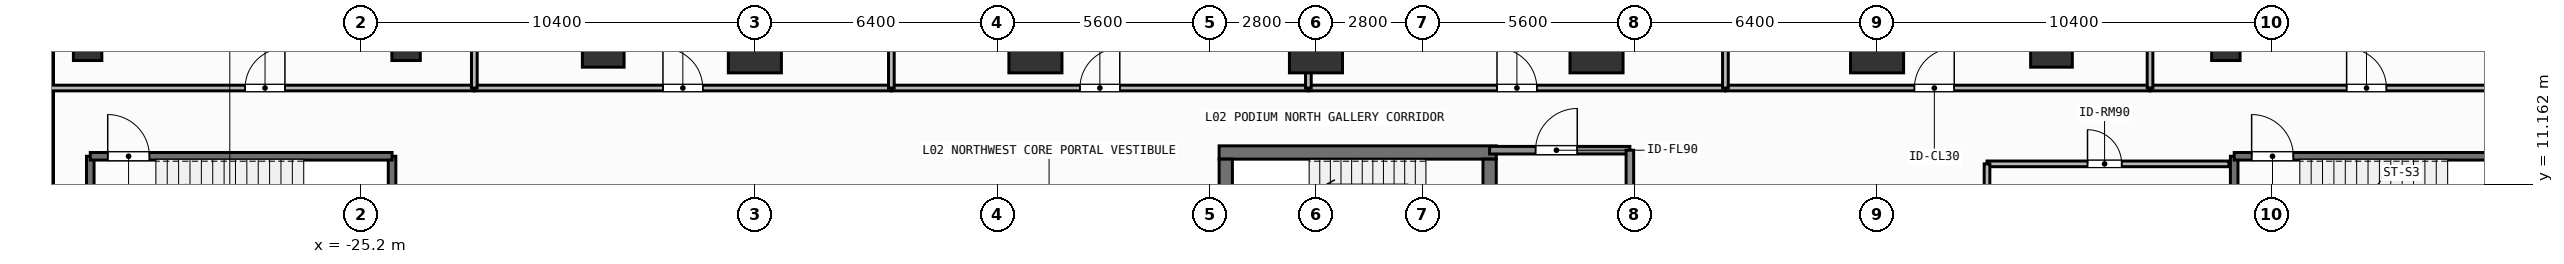
"""IFC4 building model, lengths in metres.
Left out: names, types, materials, properties, quantities, classifications, styles, units other than length and angle.
Written with IfcOpenShell. Run it as: python <this file> out.ifc"""

import sys

from ifc_helpers import new_model, si_unit, direction, frame, frame_2d, origin, origin_2d, place, context, subcontext, project, spatial, rectangle, extrude, element, fill, save


model = new_model("IFC4")
c1 = context("Model", 3, precision=1e-05, world=origin(), true_north=direction((0.0, 1.0)))
c2 = subcontext(c1, "Body", "Model", "MODEL_VIEW")
j1 = project(units=[si_unit("LENGTHUNIT", "METRE"), si_unit("PLANEANGLEUNIT", "RADIAN")], contexts=[c1])
p1 = place(None, origin())
s1 = spatial("IfcSite", under=j1, at=p1, CompositionType="ELEMENT")
p2 = place(p1, origin())
s2 = spatial("IfcBuilding", under=s1, at=p2, CompositionType="ELEMENT")
p3 = place(p2, frame((0.0, 0.0, 4.8)))
s3 = spatial("IfcBuildingStorey", under=s2, at=p3, CompositionType="ELEMENT", Elevation=4.8)
p4 = place(p3, frame((-2.555, 12.0, 0.0), z_axis=(0.0, 0.0, 1.0), x_axis=(1.0, 0.0, 0.0)))
e1 = element("IfcWall", 1, at=p4, inside=s3, PredefinedType="SHEAR", context=c2, shape_type="SweptSolid", body=[
    extrude(rectangle(XDim=7.31, YDim=0.35, at=frame_2d((3.655, 0.0))), origin(), (0.0, 0.0, 1.0), 4.2),
])
p5 = place(p3, frame((-2.38, 8.9, 0.0), z_axis=(0.0, 0.0, 1.0), x_axis=(0.0, 1.0, 0.0)))
e2 = element("IfcWall", 2, at=p5, inside=s3, PredefinedType="SHEAR", context=c2, shape_type="SweptSolid", body=[
    extrude(rectangle(XDim=2.925, YDim=0.35, at=frame_2d((1.462, 0.0))), origin(), (0.0, 0.0, 1.0), 4.2),
])
p6 = place(p3, frame((4.58, 11.825, 0.0), z_axis=(0.0, 0.0, 1.0), x_axis=(0.0, -1.0, 0.0)))
e3 = element("IfcWall", 3, at=p6, inside=s3, PredefinedType="SHEAR", context=c2, shape_type="SweptSolid", body=[
    extrude(rectangle(XDim=2.925, YDim=0.35, at=frame_2d((1.462, 0.0))), origin(), (0.0, 0.0, 1.0), 4.2),
])
p7 = place(p6, frame((0.913, 0.0, 0.0)))
e4 = element("IfcOpeningElement", 4, at=p7, cuts=e3, PredefinedType="OPENING", context=c2, shape_type="SweptSolid", body=[
    extrude(rectangle(XDim=1.1, YDim=2.15, at=frame_2d((0.55, 1.075))), frame((0.0, 0.185, 0.0), z_axis=(0.0, -1.0, 0.0), x_axis=(1.0, 0.0, 0.0)), (0.0, 0.0, 1.0), 0.37),
])
for number, where, z_axis, x_axis in (
    (5, (-14.8, 14.8, 0.0), (0.0, 0.0, 1.0), (1.0, 0.0, 0.0)),
    (6, (-7.4, 14.8, 0.0), (0.0, 0.0, 1.0), (1.0, 0.0, 0.0)),
    (7, (0.0, 14.8, 0.0), (0.0, 0.0, 1.0), (1.0, 0.0, 0.0)),
    (8, (7.4, 14.8, 0.0), (0.0, 0.0, 1.0), (1.0, 0.0, 0.0)),
    (9, (14.8, 14.8, 0.0), (0.0, 0.0, 1.0), (1.0, 0.0, 0.0)),
):
    element("IfcColumn", number, at=place(p3, frame(where, z_axis=z_axis, x_axis=x_axis)), inside=s3, PredefinedType="COLUMN", context=c2, shape_type="SweptSolid", body=[
        extrude(rectangle(XDim=1.4, YDim=1.4, at=origin_2d()), origin(), (0.0, 0.0, 1.0), 4.2),
    ])
for number, where, z_axis, x_axis in (
    (10, (-18.8, 14.8, 0.0), (0.0, 0.0, 1.0), (1.0, 0.0, 0.0)),
    (11, (19.4, 14.8, 0.0), (0.0, 0.0, 1.0), (1.0, 0.0, 0.0)),
):
    element("IfcColumn", number, at=place(p3, frame(where, z_axis=z_axis, x_axis=x_axis)), inside=s3, PredefinedType="COLUMN", context=c2, shape_type="SweptSolid", body=[
        extrude(rectangle(XDim=1.1, YDim=1.1, at=origin_2d()), origin(), (0.0, 0.0, 1.0), 4.2),
    ])
for number, where, z_axis, x_axis in (
    (12, (-32.4, 14.8, 0.0), (0.0, 0.0, 1.0), (1.0, 0.0, 0.0)),
    (13, (-24.0, 14.8, 0.0), (0.0, 0.0, 1.0), (1.0, 0.0, 0.0)),
    (14, (24.0, 14.8, 0.0), (0.0, 0.0, 1.0), (1.0, 0.0, 0.0)),
):
    element("IfcColumn", number, at=place(p3, frame(where, z_axis=z_axis, x_axis=x_axis)), inside=s3, PredefinedType="COLUMN", context=c2, shape_type="SweptSolid", body=[
        extrude(rectangle(XDim=0.75, YDim=0.75, at=origin_2d()), origin(), (0.0, 0.0, 1.0), 4.2),
    ])
p8 = place(p3, frame((-33.45, 6.41, 0.0), z_axis=(0.0, 0.0, 1.0), x_axis=(0.0, 1.0, 0.0)))
e15 = element("IfcWall", 15, at=p8, inside=s3, PredefinedType="SOLIDWALL", context=c2, shape_type="SweptSolid", body=[
    extrude(rectangle(XDim=14.09, YDim=0.3, at=frame_2d((7.045, 0.0))), origin(), (0.0, 0.0, 1.0), 3.96),
])
for number, where, z_axis, x_axis in (
    (16, (-32.33, 8.48, 0.0), (0.0, 0.0, 1.0), (0.0, 1.0, 0.0)),
    (17, (-24.37, 11.9, 0.0), (0.0, 0.0, 1.0), (0.0, -1.0, 0.0)),
):
    element("IfcWall", number, at=place(p3, frame(where, z_axis=z_axis, x_axis=x_axis)), inside=s3, PredefinedType="SHEAR", context=c2, shape_type="SweptSolid", body=[
        extrude(rectangle(XDim=3.42, YDim=0.2, at=frame_2d((1.71, 0.0))), origin(), (0.0, 0.0, 1.0), 3.96),
    ])
p9 = place(p3, frame((-32.33, 11.9, 0.0), z_axis=(0.0, 0.0, 1.0), x_axis=(1.0, 0.0, 0.0)))
e18 = element("IfcWall", 18, at=p9, inside=s3, PredefinedType="SHEAR", context=c2, shape_type="SweptSolid", body=[
    extrude(rectangle(XDim=7.96, YDim=0.2, at=frame_2d((3.98, 0.0))), origin(), (0.0, 0.0, 1.0), 3.96),
])
p10 = place(p9, frame((0.46, 0.0, 0.0)))
e19 = element("IfcOpeningElement", 19, at=p10, cuts=e18, PredefinedType="OPENING", context=c2, shape_type="SweptSolid", body=[
    extrude(rectangle(XDim=1.1, YDim=2.15, at=frame_2d((0.55, 1.075))), frame((0.0, 0.11, 0.0), z_axis=(0.0, -1.0, 0.0), x_axis=(1.0, 0.0, 0.0)), (0.0, 0.0, 1.0), 0.22),
])
p11 = place(p3, frame((24.22, 8.48, 0.0), z_axis=(0.0, 0.0, 1.0), x_axis=(0.0, 1.0, 0.0)))
e20 = element("IfcWall", 20, at=p11, inside=s3, PredefinedType="SHEAR", context=c2, shape_type="SweptSolid", body=[
    extrude(rectangle(XDim=3.42, YDim=0.2, at=frame_2d((1.71, 0.0))), origin(), (0.0, 0.0, 1.0), 3.96),
])
p12 = place(p3, frame((24.22, 11.9, 0.0), z_axis=(0.0, 0.0, 1.0), x_axis=(1.0, 0.0, 0.0)))
e21 = element("IfcWall", 21, at=p12, inside=s3, PredefinedType="SHEAR", context=c2, shape_type="SweptSolid", body=[
    extrude(rectangle(XDim=7.96, YDim=0.2, at=frame_2d((3.98, 0.0))), origin(), (0.0, 0.0, 1.0), 3.96),
])
p13 = place(p12, frame((0.46, 0.0, 0.0)))
e22 = element("IfcOpeningElement", 22, at=p13, cuts=e21, PredefinedType="OPENING", context=c2, shape_type="SweptSolid", body=[
    extrude(rectangle(XDim=1.1, YDim=2.15, at=frame_2d((0.55, 1.075))), frame((0.0, 0.11, 0.0), z_axis=(0.0, -1.0, 0.0), x_axis=(1.0, 0.0, 0.0)), (0.0, 0.0, 1.0), 0.22),
])
p14 = place(p3, frame((4.58, 12.06, 0.0), z_axis=(0.0, 0.0, 1.0), x_axis=(1.0, 0.0, 0.0)))
e23 = element("IfcWall", 23, at=p14, inside=s3, PredefinedType="SOLIDWALL", context=c2, shape_type="SweptSolid", body=[
    extrude(rectangle(XDim=3.7, YDim=0.2, at=frame_2d((1.85, 0.0))), origin(), (0.0, 0.0, 1.0), 3.96),
])
p15 = place(p14, frame((1.212, 0.0, 0.0)))
e24 = element("IfcOpeningElement", 24, at=p15, cuts=e23, PredefinedType="OPENING", context=c2, shape_type="SweptSolid", body=[
    extrude(rectangle(XDim=1.1, YDim=2.15, at=frame_2d((0.55, 1.075))), frame((0.0, 0.11, 0.0), z_axis=(0.0, -1.0, 0.0), x_axis=(1.0, 0.0, 0.0)), (0.0, 0.0, 1.0), 0.22),
])
p16 = place(p3, frame((-33.42, 13.7, 0.0), z_axis=(0.0, 0.0, 1.0), x_axis=(1.0, 0.0, 0.0)))
e25 = element("IfcWall", 25, at=p16, inside=s3, PredefinedType="PARTITIONING", context=c2, shape_type="SweptSolid", body=[
    extrude(rectangle(XDim=11.22, YDim=0.15, at=frame_2d((5.61, 0.0))), origin(), (0.0, 0.0, 1.0), 3.96),
])
p17 = place(p16, frame((5.175, 0.0, 0.0)))
e26 = element("IfcOpeningElement", 26, at=p17, cuts=e25, PredefinedType="OPENING", context=c2, shape_type="SweptSolid", body=[
    extrude(rectangle(XDim=1.05, YDim=2.2, at=frame_2d((0.525, 1.1))), frame((0.0, 0.085, 0.0), z_axis=(0.0, -1.0, 0.0), x_axis=(1.0, 0.0, 0.0)), (0.0, 0.0, 1.0), 0.17),
])
p18 = place(p3, frame((-22.2, 13.7, 0.0), z_axis=(0.0, 0.0, 1.0), x_axis=(1.0, 0.0, 0.0)))
e27 = element("IfcWall", 27, at=p18, inside=s3, PredefinedType="PARTITIONING", context=c2, shape_type="SweptSolid", body=[
    extrude(rectangle(XDim=11.0, YDim=0.15, at=frame_2d((5.5, 0.0))), origin(), (0.0, 0.0, 1.0), 3.96),
])
p19 = place(p18, frame((4.975, 0.0, 0.0)))
e28 = element("IfcOpeningElement", 28, at=p19, cuts=e27, PredefinedType="OPENING", context=c2, shape_type="SweptSolid", body=[
    extrude(rectangle(XDim=1.05, YDim=2.2, at=frame_2d((0.525, 1.1))), frame((0.0, 0.085, 0.0), z_axis=(0.0, -1.0, 0.0), x_axis=(1.0, 0.0, 0.0)), (0.0, 0.0, 1.0), 0.17),
])
p20 = place(p3, frame((-11.2, 13.7, 0.0), z_axis=(0.0, 0.0, 1.0), x_axis=(1.0, 0.0, 0.0)))
e29 = element("IfcWall", 29, at=p20, inside=s3, PredefinedType="PARTITIONING", context=c2, shape_type="SweptSolid", body=[
    extrude(rectangle(XDim=11.0, YDim=0.15, at=frame_2d((5.5, 0.0))), origin(), (0.0, 0.0, 1.0), 3.96),
])
p21 = place(p20, frame((4.975, 0.0, 0.0)))
e30 = element("IfcOpeningElement", 30, at=p21, cuts=e29, PredefinedType="OPENING", context=c2, shape_type="SweptSolid", body=[
    extrude(rectangle(XDim=1.05, YDim=2.2, at=frame_2d((0.525, 1.1))), frame((0.0, 0.085, 0.0), z_axis=(0.0, -1.0, 0.0), x_axis=(1.0, 0.0, 0.0)), (0.0, 0.0, 1.0), 0.17),
])
p22 = place(p3, frame((-0.2, 13.7, 0.0), z_axis=(0.0, 0.0, 1.0), x_axis=(1.0, 0.0, 0.0)))
e31 = element("IfcWall", 31, at=p22, inside=s3, PredefinedType="PARTITIONING", context=c2, shape_type="SweptSolid", body=[
    extrude(rectangle(XDim=11.0, YDim=0.15, at=frame_2d((5.5, 0.0))), origin(), (0.0, 0.0, 1.0), 3.96),
])
p23 = place(p22, frame((4.975, 0.0, 0.0)))
e32 = element("IfcOpeningElement", 32, at=p23, cuts=e31, PredefinedType="OPENING", context=c2, shape_type="SweptSolid", body=[
    extrude(rectangle(XDim=1.05, YDim=2.2, at=frame_2d((0.525, 1.1))), frame((0.0, 0.085, 0.0), z_axis=(0.0, -1.0, 0.0), x_axis=(1.0, 0.0, 0.0)), (0.0, 0.0, 1.0), 0.17),
])
p24 = place(p3, frame((10.8, 13.7, 0.0), z_axis=(0.0, 0.0, 1.0), x_axis=(1.0, 0.0, 0.0)))
e33 = element("IfcWall", 33, at=p24, inside=s3, PredefinedType="PARTITIONING", context=c2, shape_type="SweptSolid", body=[
    extrude(rectangle(XDim=11.2, YDim=0.15, at=frame_2d((5.6, 0.0))), origin(), (0.0, 0.0, 1.0), 3.96),
])
p25 = place(p24, frame((4.986, 0.0, 0.0)))
e34 = element("IfcOpeningElement", 34, at=p25, cuts=e33, PredefinedType="OPENING", context=c2, shape_type="SweptSolid", body=[
    extrude(rectangle(XDim=1.05, YDim=2.2, at=frame_2d((0.525, 1.1))), frame((0.0, 0.085, 0.0), z_axis=(0.0, -1.0, 0.0), x_axis=(1.0, 0.0, 0.0)), (0.0, 0.0, 1.0), 0.17),
])
p26 = place(p3, frame((22.0, 13.7, 0.0), z_axis=(0.0, 0.0, 1.0), x_axis=(1.0, 0.0, 0.0)))
e35 = element("IfcWall", 35, at=p26, inside=s3, PredefinedType="PARTITIONING", context=c2, shape_type="SweptSolid", body=[
    extrude(rectangle(XDim=11.42, YDim=0.15, at=frame_2d((5.71, 0.0))), origin(), (0.0, 0.0, 1.0), 3.96),
])
p27 = place(p26, frame((5.185, 0.0, 0.0)))
e36 = element("IfcOpeningElement", 36, at=p27, cuts=e35, PredefinedType="OPENING", context=c2, shape_type="SweptSolid", body=[
    extrude(rectangle(XDim=1.05, YDim=2.2, at=frame_2d((0.525, 1.1))), frame((0.0, 0.085, 0.0), z_axis=(0.0, -1.0, 0.0), x_axis=(1.0, 0.0, 0.0)), (0.0, 0.0, 1.0), 0.17),
])
p28 = place(p3, frame((17.7, 11.7, 0.0), z_axis=(0.0, 0.0, 1.0), x_axis=(1.0, 0.0, 0.0)))
e37 = element("IfcWall", 37, at=p28, inside=s3, PredefinedType="PARTITIONING", context=c2, shape_type="SweptSolid", body=[
    extrude(rectangle(XDim=6.38, YDim=0.15, at=frame_2d((3.19, 0.0))), origin(), (0.0, 0.0, 1.0), 3.96),
])
p29 = place(p28, frame((2.651, 0.0, 0.0)))
e38 = element("IfcOpeningElement", 38, at=p29, cuts=e37, PredefinedType="OPENING", context=c2, shape_type="SweptSolid", body=[
    extrude(rectangle(XDim=0.9, YDim=2.1, at=frame_2d((0.45, 1.05))), frame((0.0, 0.085, 0.0), z_axis=(0.0, -1.0, 0.0), x_axis=(1.0, 0.0, 0.0)), (0.0, 0.0, 1.0), 0.17),
])
p30 = place(p3, frame((8.28, 8.95, 0.0), z_axis=(0.0, 0.0, 1.0), x_axis=(0.0, 1.0, 0.0)))
e39 = element("IfcWall", 39, at=p30, inside=s3, PredefinedType="SOLIDWALL", context=c2, shape_type="SweptSolid", body=[
    extrude(rectangle(XDim=3.11, YDim=0.2, at=frame_2d((1.555, 0.0))), origin(), (0.0, 0.0, 1.0), 3.96),
])
for number, where, z_axis, x_axis in (
    (40, (-22.2, 13.7, 0.0), (0.0, 0.0, 1.0), (0.0, 1.0, 0.0)),
    (41, (-11.2, 13.7, 0.0), (0.0, 0.0, 1.0), (0.0, 1.0, 0.0)),
):
    element("IfcWall", number, at=place(p3, frame(where, z_axis=z_axis, x_axis=x_axis)), inside=s3, PredefinedType="PARTITIONING", context=c2, shape_type="SweptSolid", body=[
        extrude(rectangle(XDim=11.22, YDim=0.15, at=frame_2d((5.61, 0.0))), origin(), (0.0, 0.0, 1.0), 3.96),
    ])
p31 = place(p3, frame((-0.2, 13.7, 0.0), z_axis=(0.0, 0.0, 1.0), x_axis=(0.0, 1.0, 0.0)))
e42 = element("IfcWall", 42, at=p31, inside=s3, PredefinedType="PARTITIONING", context=c2, shape_type="SweptSolid", body=[
    extrude(rectangle(XDim=11.22, YDim=0.15, at=frame_2d((5.61, 0.0))), origin(), (0.0, 0.0, 1.0), 3.25),
])
for number, where, z_axis, x_axis in (
    (43, (10.8, 13.7, 0.0), (0.0, 0.0, 1.0), (0.0, 1.0, 0.0)),
    (44, (22.0, 13.7, 0.0), (0.0, 0.0, 1.0), (0.0, 1.0, 0.0)),
):
    element("IfcWall", number, at=place(p3, frame(where, z_axis=z_axis, x_axis=x_axis)), inside=s3, PredefinedType="PARTITIONING", context=c2, shape_type="SweptSolid", body=[
        extrude(rectangle(XDim=11.22, YDim=0.15, at=frame_2d((5.61, 0.0))), origin(), (0.0, 0.0, 1.0), 3.96),
    ])
p32 = place(p3, frame((17.7, 6.95, 0.0), z_axis=(0.0, 0.0, 1.0), x_axis=(0.0, 1.0, 0.0)))
e45 = element("IfcWall", 45, at=p32, inside=s3, PredefinedType="PARTITIONING", context=c2, shape_type="SweptSolid", body=[
    extrude(rectangle(XDim=4.75, YDim=0.15, at=frame_2d((2.375, 0.0))), origin(), (0.0, 0.0, 1.0), 3.96),
])
p33 = place(p10, origin())
e46 = element("IfcDoor", 46, at=p33, inside=s3, OperationType="SINGLE_SWING_LEFT", PredefinedType="DOOR", context=c2, shape_type="SweptSolid", body=[
    extrude(rectangle(XDim=1.1, YDim=2.15, at=frame_2d((0.55, 1.075))), frame((0.0, 0.025, 0.0), z_axis=(0.0, -1.0, 0.0), x_axis=(1.0, 0.0, 0.0)), (0.0, 0.0, 1.0), 0.05),
])
fill(e19, e46)
p34 = place(p13, origin())
e47 = element("IfcDoor", 47, at=p34, inside=s3, OperationType="SINGLE_SWING_LEFT", PredefinedType="DOOR", context=c2, shape_type="SweptSolid", body=[
    extrude(rectangle(XDim=1.1, YDim=2.15, at=frame_2d((0.55, 1.075))), frame((0.0, 0.025, 0.0), z_axis=(0.0, -1.0, 0.0), x_axis=(1.0, 0.0, 0.0)), (0.0, 0.0, 1.0), 0.05),
])
fill(e22, e47)
p35 = place(p15, origin())
e48 = element("IfcDoor", 48, at=p35, inside=s3, OperationType="SINGLE_SWING_RIGHT", PredefinedType="DOOR", context=c2, shape_type="SweptSolid", body=[
    extrude(rectangle(XDim=1.1, YDim=2.15, at=frame_2d((0.55, 1.075))), frame((0.0, 0.025, 0.0), z_axis=(0.0, -1.0, 0.0), x_axis=(1.0, 0.0, 0.0)), (0.0, 0.0, 1.0), 0.05),
])
fill(e24, e48)
p36 = place(p17, origin())
e49 = element("IfcDoor", 49, at=p36, inside=s3, OperationType="SINGLE_SWING_RIGHT", PredefinedType="DOOR", context=c2, shape_type="SweptSolid", body=[
    extrude(rectangle(XDim=1.05, YDim=2.2, at=frame_2d((0.525, 1.1))), frame((0.0, 0.025, 0.0), z_axis=(0.0, -1.0, 0.0), x_axis=(1.0, 0.0, 0.0)), (0.0, 0.0, 1.0), 0.05),
])
fill(e26, e49)
p37 = place(p19, origin())
e50 = element("IfcDoor", 50, at=p37, inside=s3, OperationType="SINGLE_SWING_LEFT", PredefinedType="DOOR", context=c2, shape_type="SweptSolid", body=[
    extrude(rectangle(XDim=1.05, YDim=2.2, at=frame_2d((0.525, 1.1))), frame((0.0, 0.025, 0.0), z_axis=(0.0, -1.0, 0.0), x_axis=(1.0, 0.0, 0.0)), (0.0, 0.0, 1.0), 0.05),
])
fill(e28, e50)
p38 = place(p21, origin())
e51 = element("IfcDoor", 51, at=p38, inside=s3, OperationType="SINGLE_SWING_RIGHT", PredefinedType="DOOR", context=c2, shape_type="SweptSolid", body=[
    extrude(rectangle(XDim=1.05, YDim=2.2, at=frame_2d((0.525, 1.1))), frame((0.0, 0.025, 0.0), z_axis=(0.0, -1.0, 0.0), x_axis=(1.0, 0.0, 0.0)), (0.0, 0.0, 1.0), 0.05),
])
fill(e30, e51)
p39 = place(p23, origin())
e52 = element("IfcDoor", 52, at=p39, inside=s3, OperationType="SINGLE_SWING_LEFT", PredefinedType="DOOR", context=c2, shape_type="SweptSolid", body=[
    extrude(rectangle(XDim=1.05, YDim=2.2, at=frame_2d((0.525, 1.1))), frame((0.0, 0.025, 0.0), z_axis=(0.0, -1.0, 0.0), x_axis=(1.0, 0.0, 0.0)), (0.0, 0.0, 1.0), 0.05),
])
fill(e32, e52)
p40 = place(p25, origin())
e53 = element("IfcDoor", 53, at=p40, inside=s3, OperationType="SINGLE_SWING_RIGHT", PredefinedType="DOOR", context=c2, shape_type="SweptSolid", body=[
    extrude(rectangle(XDim=1.05, YDim=2.2, at=frame_2d((0.525, 1.1))), frame((0.0, 0.025, 0.0), z_axis=(0.0, -1.0, 0.0), x_axis=(1.0, 0.0, 0.0)), (0.0, 0.0, 1.0), 0.05),
])
fill(e34, e53)
p41 = place(p27, origin())
e54 = element("IfcDoor", 54, at=p41, inside=s3, OperationType="SINGLE_SWING_LEFT", PredefinedType="DOOR", context=c2, shape_type="SweptSolid", body=[
    extrude(rectangle(XDim=1.05, YDim=2.2, at=frame_2d((0.525, 1.1))), frame((0.0, 0.025, 0.0), z_axis=(0.0, -1.0, 0.0), x_axis=(1.0, 0.0, 0.0)), (0.0, 0.0, 1.0), 0.05),
])
fill(e36, e54)
p42 = place(p29, origin())
e55 = element("IfcDoor", 55, at=p42, inside=s3, OperationType="SINGLE_SWING_LEFT", PredefinedType="DOOR", context=c2, shape_type="SweptSolid", body=[
    extrude(rectangle(XDim=0.9, YDim=2.1, at=frame_2d((0.45, 1.05))), frame((0.0, 0.025, 0.0), z_axis=(0.0, -1.0, 0.0), x_axis=(1.0, 0.0, 0.0)), (0.0, 0.0, 1.0), 0.05),
])
fill(e38, e55)
save(model, sys.argv[1])
